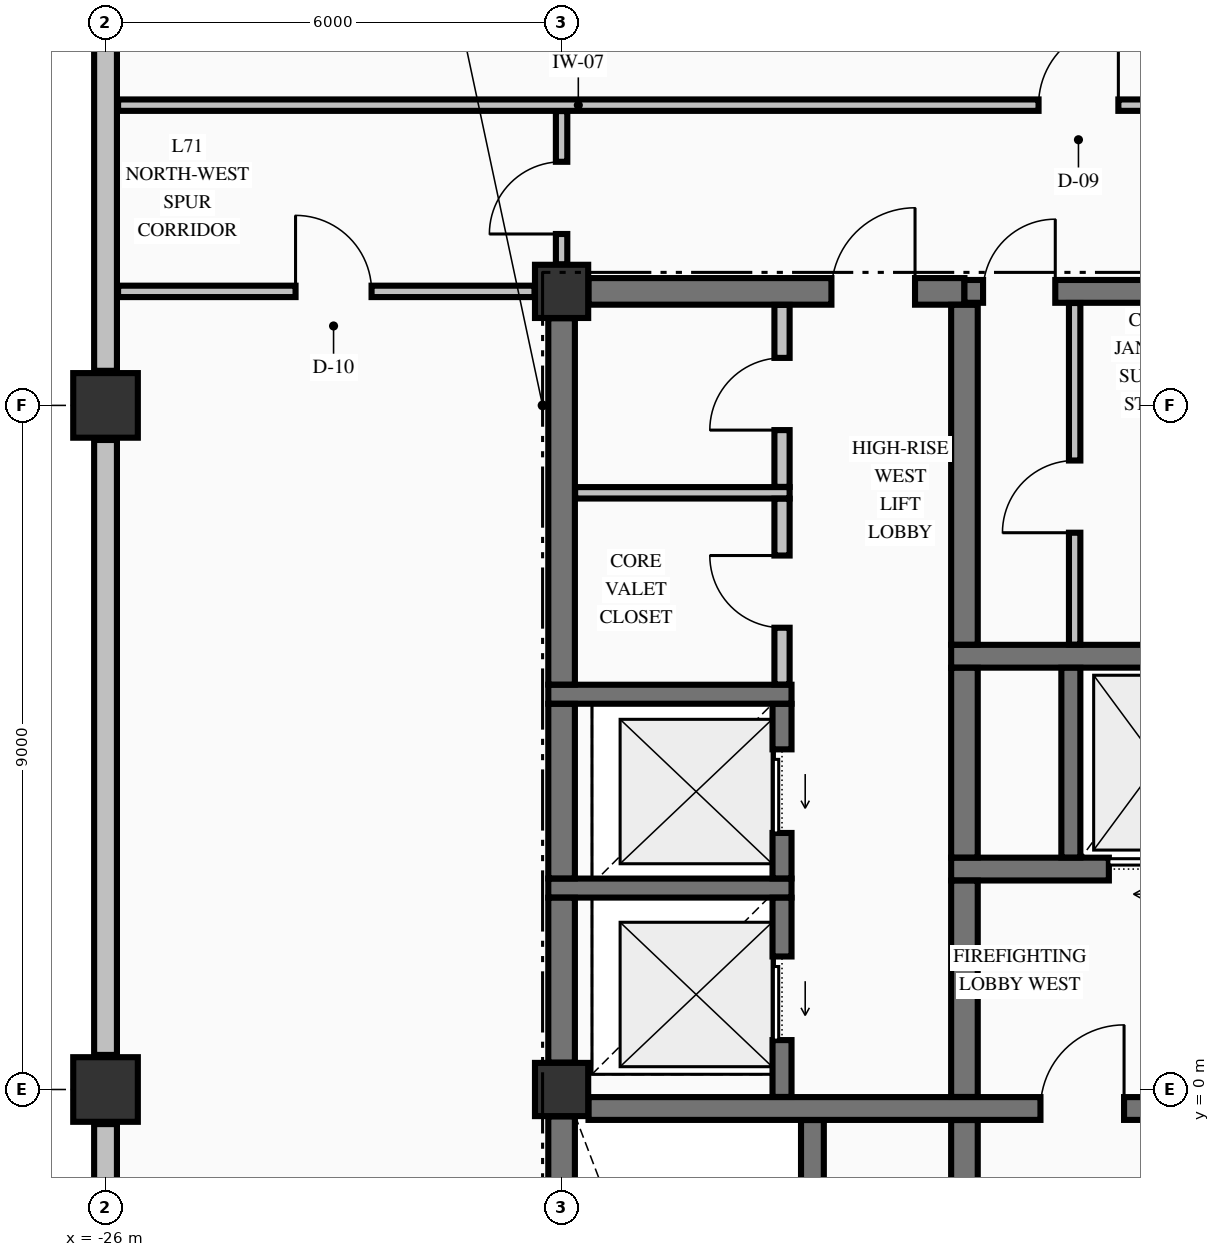
"""IFC4 building model, lengths in metres.
Left out: names, types, materials, properties, quantities, classifications, styles, units other than length and angle.
Written with IfcOpenShell. Run it as: python <this file> out.ifc"""

import sys

from ifc_helpers import new_model, si_unit, direction, frame, frame_2d, origin, origin_2d, place, context, subcontext, project, spatial, rectangle, extrude, element, fill, save


model = new_model("IFC4")
c1 = context("Model", 3, precision=1e-05, world=origin(), true_north=direction((0.0, 1.0)))
c2 = subcontext(c1, "Body", "Model", "MODEL_VIEW")
j1 = project(units=[si_unit("LENGTHUNIT", "METRE"), si_unit("PLANEANGLEUNIT", "RADIAN")], contexts=[c1])
p1 = place(None, origin())
s1 = spatial("IfcSite", under=j1, at=p1, CompositionType="ELEMENT")
p2 = place(p1, origin())
s2 = spatial("IfcBuilding", under=s1, at=p2, CompositionType="ELEMENT")
p3 = place(p2, frame((0.0, 0.0, 267.35)))
s3 = spatial("IfcBuildingStorey", under=s2, at=p3, CompositionType="ELEMENT", Elevation=267.35)
for number, where, z_axis, x_axis in (
    (1, (-26.0, 0.0, -0.25), (0.0, 0.0, 1.0), (1.0, 0.0, 0.0)),
    (2, (-26.0, 9.0, -0.25), (0.0, 0.0, 1.0), (1.0, 0.0, 0.0)),
):
    element("IfcColumn", number, at=place(p3, frame(where, z_axis=z_axis, x_axis=x_axis)), inside=s3, PredefinedType="COLUMN", context=c2, shape_type="SweptSolid", body=[
        extrude(rectangle(XDim=0.85, YDim=0.85, at=origin_2d()), origin(), (0.0, 0.0, 1.0), 3.155),
    ])
for number, where, z_axis, x_axis in (
    (3, (-20.0, 10.5, -0.25), (0.0, 0.0, 1.0), (1.0, 0.0, 0.0)),
    (4, (-20.0, 0.0, -0.25), (0.0, 0.0, 1.0), (1.0, 0.0, 0.0)),
):
    element("IfcColumn", number, at=place(p3, frame(where, z_axis=z_axis, x_axis=x_axis)), inside=s3, PredefinedType="COLUMN", context=c2, shape_type="SweptSolid", body=[
        extrude(rectangle(XDim=0.7, YDim=0.7, at=origin_2d()), origin(), (0.0, 0.0, 1.0), 3.155),
    ])
for number, where, z_axis, x_axis in (
    (5, (-26.0, -0.455, 0.0), (0.0, 0.0, 1.0), (0.0, -1.0, 0.0)),
    (6, (-26.0, 8.545, 0.0), (0.0, 0.0, 1.0), (0.0, -1.0, 0.0)),
    (7, (-26.0, 17.545, 0.0), (0.0, 0.0, 1.0), (0.0, -1.0, 0.0)),
):
    element("IfcWall", number, at=place(p3, frame(where, z_axis=z_axis, x_axis=x_axis)), inside=s3, PredefinedType="STANDARD", context=c2, shape_type="SweptSolid", body=[
        extrude(rectangle(XDim=8.09, YDim=0.3, at=frame_2d((4.045, 0.0))), origin(), (0.0, 0.0, 1.0), 2.297),
    ])
p4 = place(p3, frame((-19.646, -0.25, 0.0), z_axis=(0.0, 0.0, 1.0), x_axis=(1.0, 0.0, 0.0)))
e8 = element("IfcWall", 8, at=p4, inside=s3, PredefinedType="SHEAR", context=c2, shape_type="SweptSolid", body=[
    extrude(rectangle(XDim=8.292, YDim=0.3, at=frame_2d((4.146, 0.0))), origin(), (0.0, 0.0, 1.0), 2.905),
])
p5 = place(p4, frame((5.946, 0.0, 0.0)))
e9 = element("IfcOpeningElement", 9, at=p5, cuts=e8, PredefinedType="OPENING", context=c2, shape_type="SweptSolid", body=[
    extrude(rectangle(XDim=1.1, YDim=2.15, at=frame_2d((0.55, 1.075))), frame((0.0, 0.16, 0.0), z_axis=(0.0, -1.0, 0.0), x_axis=(1.0, 0.0, 0.0)), (0.0, 0.0, 1.0), 0.32),
])
p6 = place(p3, frame((-20.175, 2.65, 0.0), z_axis=(0.0, 0.0, 1.0), x_axis=(1.0, 0.0, 0.0)))
e10 = element("IfcWall", 10, at=p6, inside=s3, PredefinedType="SOLIDWALL", context=c2, shape_type="SweptSolid", body=[
    extrude(rectangle(XDim=3.2, YDim=0.25, at=frame_2d((1.6, 0.0))), origin(), (0.0, 0.0, 1.0), 2.905),
])
p7 = place(p3, frame((-14.875, 2.9, 0.0), z_axis=(0.0, 0.0, 1.0), x_axis=(1.0, 0.0, 0.0)))
e11 = element("IfcWall", 11, at=p7, inside=s3, PredefinedType="SHEAR", context=c2, shape_type="SweptSolid", body=[
    extrude(rectangle(XDim=4.025, YDim=0.3, at=frame_2d((2.012, 0.0))), origin(), (0.0, 0.0, 1.0), 2.905),
])
p8 = place(p7, frame((2.075, 0.0, 0.0)))
e12 = element("IfcOpeningElement", 12, at=p8, cuts=e11, PredefinedType="OPENING", context=c2, shape_type="SweptSolid", body=[
    extrude(rectangle(XDim=1.1, YDim=2.2, at=frame_2d((0.55, 1.1))), frame((0.0, 0.16, 0.0), z_axis=(0.0, -1.0, 0.0), x_axis=(1.0, 0.0, 0.0)), (0.0, 0.0, 1.0), 0.32),
])
p9 = place(p3, frame((-20.175, 5.2, 0.0), z_axis=(0.0, 0.0, 1.0), x_axis=(1.0, 0.0, 0.0)))
e13 = element("IfcWall", 13, at=p9, inside=s3, PredefinedType="SOLIDWALL", context=c2, shape_type="SweptSolid", body=[
    extrude(rectangle(XDim=3.2, YDim=0.25, at=frame_2d((1.6, 0.0))), origin(), (0.0, 0.0, 1.0), 2.905),
])
p10 = place(p3, frame((-14.875, 5.7, 0.0), z_axis=(0.0, 0.0, 1.0), x_axis=(1.0, 0.0, 0.0)))
e14 = element("IfcWall", 14, at=p10, inside=s3, PredefinedType="SHEAR", context=c2, shape_type="SweptSolid", body=[
    extrude(rectangle(XDim=4.025, YDim=0.3, at=frame_2d((2.012, 0.0))), origin(), (0.0, 0.0, 1.0), 2.905),
])
p11 = place(p3, frame((-19.646, 10.5, 0.0), z_axis=(0.0, 0.0, 1.0), x_axis=(1.0, 0.0, 0.0)))
e15 = element("IfcWall", 15, at=p11, inside=s3, PredefinedType="SHEAR", context=c2, shape_type="SweptSolid", body=[
    extrude(rectangle(XDim=4.946, YDim=0.35, at=frame_2d((2.473, 0.0))), origin(), (0.0, 0.0, 1.0), 2.905),
])
p12 = place(p11, frame((3.196, 0.0, 0.0)))
e16 = element("IfcOpeningElement", 16, at=p12, cuts=e15, PredefinedType="OPENING", context=c2, shape_type="SweptSolid", body=[
    extrude(rectangle(XDim=1.1, YDim=2.15, at=frame_2d((0.55, 1.075))), frame((0.0, 0.185, 0.0), z_axis=(0.0, -1.0, 0.0), x_axis=(1.0, 0.0, 0.0)), (0.0, 0.0, 1.0), 0.37),
])
p13 = place(p3, frame((-14.7, 10.5, 0.0), z_axis=(0.0, 0.0, 1.0), x_axis=(1.0, 0.0, 0.0)))
e17 = element("IfcWall", 17, at=p13, inside=s3, PredefinedType="SHEAR", context=c2, shape_type="SweptSolid", body=[
    extrude(rectangle(XDim=3.346, YDim=0.3, at=frame_2d((1.673, 0.0))), origin(), (0.0, 0.0, 1.0), 2.905),
])
p14 = place(p13, frame((0.245, 0.0, 0.0)))
e18 = element("IfcOpeningElement", 18, at=p14, cuts=e17, PredefinedType="OPENING", context=c2, shape_type="SweptSolid", body=[
    extrude(rectangle(XDim=0.95, YDim=2.15, at=frame_2d((0.475, 1.075))), frame((0.0, 0.16, 0.0), z_axis=(0.0, -1.0, 0.0), x_axis=(1.0, 0.0, 0.0)), (0.0, 0.0, 1.0), 0.32),
])
p15 = place(p3, frame((-19.822, 7.85, 0.0), z_axis=(0.0, 0.0, 1.0), x_axis=(1.0, 0.0, 0.0)))
e19 = element("IfcWall", 19, at=p15, inside=s3, PredefinedType="PARTITIONING", context=c2, shape_type="SweptSolid", body=[
    extrude(rectangle(XDim=2.822, YDim=0.15, at=frame_2d((1.411, 0.0))), origin(), (0.0, 0.0, 1.0), 2.905),
])
p16 = place(p3, frame((-25.835, 10.5, 0.0), z_axis=(0.0, 0.0, 1.0), x_axis=(1.0, 0.0, 0.0)))
e20 = element("IfcWall", 20, at=p16, inside=s3, PredefinedType="PARTITIONING", context=c2, shape_type="SweptSolid", body=[
    extrude(rectangle(XDim=5.479, YDim=0.15, at=frame_2d((2.74, 0.0))), origin(), (0.0, 0.0, 1.0), 2.905),
])
p17 = place(p16, frame((2.335, 0.0, 0.0)))
e21 = element("IfcOpeningElement", 21, at=p17, cuts=e20, PredefinedType="OPENING", context=c2, shape_type="SweptSolid", body=[
    extrude(rectangle(XDim=1.0, YDim=2.15, at=frame_2d((0.5, 1.075))), frame((0.0, 0.085, 0.0), z_axis=(0.0, -1.0, 0.0), x_axis=(1.0, 0.0, 0.0)), (0.0, 0.0, 1.0), 0.17),
])
p18 = place(p3, frame((-25.835, 12.95, 0.0), z_axis=(0.0, 0.0, 1.0), x_axis=(1.0, 0.0, 0.0)))
e22 = element("IfcWall", 22, at=p18, inside=s3, PredefinedType="PARTITIONING", context=c2, shape_type="SweptSolid", body=[
    extrude(rectangle(XDim=45.91, YDim=0.15, at=frame_2d((22.955, 0.0))), origin(), (0.0, 0.0, 1.0), 2.905),
])
p19 = place(p18, frame((12.11, 0.0, 0.0)))
e23 = element("IfcOpeningElement", 23, at=p19, cuts=e22, PredefinedType="OPENING", context=c2, shape_type="SweptSolid", body=[
    extrude(rectangle(XDim=1.05, YDim=2.15, at=frame_2d((0.525, 1.075))), frame((0.0, 0.085, 0.0), z_axis=(0.0, -1.0, 0.0), x_axis=(1.0, 0.0, 0.0)), (0.0, 0.0, 1.0), 0.17),
])
p20 = place(p18, frame((23.71, 0.0, 0.0)))
e24 = element("IfcOpeningElement", 24, at=p20, cuts=e22, PredefinedType="OPENING", context=c2, shape_type="SweptSolid", body=[
    extrude(rectangle(XDim=1.05, YDim=2.15, at=frame_2d((0.525, 1.075))), frame((0.0, 0.085, 0.0), z_axis=(0.0, -1.0, 0.0), x_axis=(1.0, 0.0, 0.0)), (0.0, 0.0, 1.0), 0.17),
])
p21 = place(p18, frame((34.76, 0.0, 0.0)))
e25 = element("IfcOpeningElement", 25, at=p21, cuts=e22, PredefinedType="OPENING", context=c2, shape_type="SweptSolid", body=[
    extrude(rectangle(XDim=1.05, YDim=2.15, at=frame_2d((0.525, 1.075))), frame((0.0, 0.085, 0.0), z_axis=(0.0, -1.0, 0.0), x_axis=(1.0, 0.0, 0.0)), (0.0, 0.0, 1.0), 0.17),
])
p22 = place(p3, frame((-20.0, -9.596, 0.0), z_axis=(0.0, 0.0, 1.0), x_axis=(0.0, 1.0, 0.0)))
e26 = element("IfcWall", 26, at=p22, inside=s3, PredefinedType="SHEAR", context=c2, shape_type="SweptSolid", body=[
    extrude(rectangle(XDim=9.242, YDim=0.35, at=frame_2d((4.621, 0.0))), origin(), (0.0, 0.0, 1.0), 2.905),
])
p23 = place(p3, frame((-20.0, 0.354, 0.0), z_axis=(0.0, 0.0, 1.0), x_axis=(0.0, 1.0, 0.0)))
e27 = element("IfcWall", 27, at=p23, inside=s3, PredefinedType="SHEAR", context=c2, shape_type="SweptSolid", body=[
    extrude(rectangle(XDim=2.169, YDim=0.35, at=frame_2d((1.084, 0.0))), origin(), (0.0, 0.0, 1.0), 2.905),
])
p24 = place(p3, frame((-20.0, 2.777, 0.0), z_axis=(0.0, 0.0, 1.0), x_axis=(0.0, 1.0, 0.0)))
e28 = element("IfcWall", 28, at=p24, inside=s3, PredefinedType="SHEAR", context=c2, shape_type="SweptSolid", body=[
    extrude(rectangle(XDim=2.296, YDim=0.35, at=frame_2d((1.148, 0.0))), origin(), (0.0, 0.0, 1.0), 2.905),
])
p25 = place(p3, frame((-20.0, 5.327, 0.0), z_axis=(0.0, 0.0, 1.0), x_axis=(0.0, 1.0, 0.0)))
e29 = element("IfcWall", 29, at=p25, inside=s3, PredefinedType="SHEAR", context=c2, shape_type="SweptSolid", body=[
    extrude(rectangle(XDim=4.819, YDim=0.35, at=frame_2d((2.41, 0.0))), origin(), (0.0, 0.0, 1.0), 2.905),
])
p26 = place(p3, frame((-17.1, -0.098, 0.0), z_axis=(0.0, 0.0, 1.0), x_axis=(0.0, 1.0, 0.0)))
e30 = element("IfcWall", 30, at=p26, inside=s3, PredefinedType="SOLIDWALL", context=c2, shape_type="SweptSolid", body=[
    extrude(rectangle(XDim=2.621, YDim=0.25, at=frame_2d((1.311, 0.0))), origin(), (0.0, 0.0, 1.0), 2.905),
])
p27 = place(p26, frame((0.748, 0.0, 0.0)))
e31 = element("IfcOpeningElement", 31, at=p27, cuts=e30, PredefinedType="OPENING", context=c2, shape_type="SweptSolid", body=[
    extrude(rectangle(XDim=1.1, YDim=2.2, at=frame_2d((0.55, 1.1))), frame((0.0, 0.135, 0.0), z_axis=(0.0, -1.0, 0.0), x_axis=(1.0, 0.0, 0.0)), (0.0, 0.0, 1.0), 0.27),
])
p28 = place(p3, frame((-17.1, 2.777, 0.0), z_axis=(0.0, 0.0, 1.0), x_axis=(0.0, 1.0, 0.0)))
e32 = element("IfcWall", 32, at=p28, inside=s3, PredefinedType="SOLIDWALL", context=c2, shape_type="SweptSolid", body=[
    extrude(rectangle(XDim=2.296, YDim=0.25, at=frame_2d((1.148, 0.0))), origin(), (0.0, 0.0, 1.0), 2.905),
])
p29 = place(p28, frame((0.598, 0.0, 0.0)))
e33 = element("IfcOpeningElement", 33, at=p29, cuts=e32, PredefinedType="OPENING", context=c2, shape_type="SweptSolid", body=[
    extrude(rectangle(XDim=1.1, YDim=2.2, at=frame_2d((0.55, 1.1))), frame((0.0, 0.135, 0.0), z_axis=(0.0, -1.0, 0.0), x_axis=(1.0, 0.0, 0.0)), (0.0, 0.0, 1.0), 0.27),
])
p30 = place(p3, frame((-16.7, -9.773, 0.0), z_axis=(0.0, 0.0, 1.0), x_axis=(0.0, 1.0, 0.0)))
e34 = element("IfcWall", 34, at=p30, inside=s3, PredefinedType="SHEAR", context=c2, shape_type="SweptSolid", body=[
    extrude(rectangle(XDim=9.371, YDim=0.3, at=frame_2d((4.686, 0.0))), origin(), (0.0, 0.0, 1.0), 2.905),
])
p31 = place(p3, frame((-14.7, -9.773, 0.0), z_axis=(0.0, 0.0, 1.0), x_axis=(0.0, 1.0, 0.0)))
e35 = element("IfcWall", 35, at=p31, inside=s3, PredefinedType="SHEAR", context=c2, shape_type="SweptSolid", body=[
    extrude(rectangle(XDim=9.371, YDim=0.35, at=frame_2d((4.686, 0.0))), origin(), (0.0, 0.0, 1.0), 2.905),
])
p32 = place(p3, frame((-14.7, -0.098, 0.0), z_axis=(0.0, 0.0, 1.0), x_axis=(0.0, 1.0, 0.0)))
e36 = element("IfcWall", 36, at=p32, inside=s3, PredefinedType="SHEAR", context=c2, shape_type="SweptSolid", body=[
    extrude(rectangle(XDim=2.846, YDim=0.35, at=frame_2d((1.423, 0.0))), origin(), (0.0, 0.0, 1.0), 2.905),
])
p33 = place(p3, frame((-14.7, 3.052, 0.0), z_axis=(0.0, 0.0, 1.0), x_axis=(0.0, 1.0, 0.0)))
e37 = element("IfcWall", 37, at=p33, inside=s3, PredefinedType="SHEAR", context=c2, shape_type="SweptSolid", body=[
    extrude(rectangle(XDim=2.496, YDim=0.35, at=frame_2d((1.248, 0.0))), origin(), (0.0, 0.0, 1.0), 2.905),
])
p34 = place(p3, frame((-14.7, 5.852, 0.0), z_axis=(0.0, 0.0, 1.0), x_axis=(0.0, 1.0, 0.0)))
e38 = element("IfcWall", 38, at=p34, inside=s3, PredefinedType="SHEAR", context=c2, shape_type="SweptSolid", body=[
    extrude(rectangle(XDim=4.471, YDim=0.35, at=frame_2d((2.235, 0.0))), origin(), (0.0, 0.0, 1.0), 2.905),
])
p35 = place(p3, frame((-13.3, 3.052, 0.0), z_axis=(0.0, 0.0, 1.0), x_axis=(0.0, 1.0, 0.0)))
e39 = element("IfcWall", 39, at=p35, inside=s3, PredefinedType="SOLIDWALL", context=c2, shape_type="SweptSolid", body=[
    extrude(rectangle(XDim=2.496, YDim=0.25, at=frame_2d((1.248, 0.0))), origin(), (0.0, 0.0, 1.0), 2.905),
])
p36 = place(p3, frame((-20.0, 10.856, 0.0), z_axis=(0.0, 0.0, 1.0), x_axis=(0.0, 1.0, 0.0)))
e40 = element("IfcWall", 40, at=p36, inside=s3, PredefinedType="PARTITIONING", context=c2, shape_type="SweptSolid", body=[
    extrude(rectangle(XDim=2.016, YDim=0.15, at=frame_2d((1.008, 0.0))), origin(), (0.0, 0.0, 1.0), 2.905),
])
p37 = place(p36, frame((0.399, 0.0, 0.0)))
e41 = element("IfcOpeningElement", 41, at=p37, cuts=e40, PredefinedType="OPENING", context=c2, shape_type="SweptSolid", body=[
    extrude(rectangle(XDim=0.95, YDim=2.15, at=frame_2d((0.475, 1.075))), frame((0.0, 0.085, 0.0), z_axis=(0.0, -1.0, 0.0), x_axis=(1.0, 0.0, 0.0)), (0.0, 0.0, 1.0), 0.17),
])
p38 = place(p3, frame((-17.1, 5.328, 0.0), z_axis=(0.0, 0.0, 1.0), x_axis=(0.0, 1.0, 0.0)))
e42 = element("IfcWall", 42, at=p38, inside=s3, PredefinedType="PARTITIONING", context=c2, shape_type="SweptSolid", body=[
    extrude(rectangle(XDim=2.444, YDim=0.2, at=frame_2d((1.222, 0.0))), origin(), (0.0, 0.0, 1.0), 2.905),
])
p39 = place(p38, frame((0.747, 0.0, 0.0)))
e43 = element("IfcOpeningElement", 43, at=p39, cuts=e42, PredefinedType="OPENING", context=c2, shape_type="SweptSolid", body=[
    extrude(rectangle(XDim=0.95, YDim=2.15, at=frame_2d((0.475, 1.075))), frame((0.0, 0.11, 0.0), z_axis=(0.0, -1.0, 0.0), x_axis=(1.0, 0.0, 0.0)), (0.0, 0.0, 1.0), 0.22),
])
p40 = place(p3, frame((-17.1, 7.928, 0.0), z_axis=(0.0, 0.0, 1.0), x_axis=(0.0, 1.0, 0.0)))
e44 = element("IfcWall", 44, at=p40, inside=s3, PredefinedType="PARTITIONING", context=c2, shape_type="SweptSolid", body=[
    extrude(rectangle(XDim=2.394, YDim=0.2, at=frame_2d((1.197, 0.0))), origin(), (0.0, 0.0, 1.0), 2.905),
])
p41 = place(p40, frame((0.747, 0.0, 0.0)))
e45 = element("IfcOpeningElement", 45, at=p41, cuts=e44, PredefinedType="OPENING", context=c2, shape_type="SweptSolid", body=[
    extrude(rectangle(XDim=0.95, YDim=2.15, at=frame_2d((0.475, 1.075))), frame((0.0, 0.11, 0.0), z_axis=(0.0, -1.0, 0.0), x_axis=(1.0, 0.0, 0.0)), (0.0, 0.0, 1.0), 0.22),
])
p42 = place(p3, frame((-13.25, 5.853, 0.0), z_axis=(0.0, 0.0, 1.0), x_axis=(0.0, 1.0, 0.0)))
e46 = element("IfcWall", 46, at=p42, inside=s3, PredefinedType="PARTITIONING", context=c2, shape_type="SweptSolid", body=[
    extrude(rectangle(XDim=4.494, YDim=0.15, at=frame_2d((2.247, 0.0))), origin(), (0.0, 0.0, 1.0), 2.905),
])
p43 = place(p42, frame((1.472, 0.0, 0.0)))
e47 = element("IfcOpeningElement", 47, at=p43, cuts=e46, PredefinedType="OPENING", context=c2, shape_type="SweptSolid", body=[
    extrude(rectangle(XDim=0.95, YDim=2.15, at=frame_2d((0.475, 1.075))), frame((0.0, 0.085, 0.0), z_axis=(0.0, -1.0, 0.0), x_axis=(1.0, 0.0, 0.0)), (0.0, 0.0, 1.0), 0.17),
])
p44 = place(p5, origin())
e48 = element("IfcDoor", 48, at=p44, inside=s3, OperationType="SINGLE_SWING_RIGHT", PredefinedType="DOOR", context=c2, shape_type="SweptSolid", body=[
    extrude(rectangle(XDim=1.1, YDim=2.15, at=frame_2d((0.55, 1.075))), frame((0.0, 0.025, 0.0), z_axis=(0.0, -1.0, 0.0), x_axis=(1.0, 0.0, 0.0)), (0.0, 0.0, 1.0), 0.05),
])
fill(e9, e48)
p45 = place(p8, origin())
e49 = element("IfcDoor", 49, at=p45, inside=s3, OperationType="SLIDING_TO_LEFT", PredefinedType="DOOR", context=c2, shape_type="SweptSolid", body=[
    extrude(rectangle(XDim=1.1, YDim=2.2, at=frame_2d((0.55, 1.1))), frame((0.0, 0.025, 0.0), z_axis=(0.0, -1.0, 0.0), x_axis=(1.0, 0.0, 0.0)), (0.0, 0.0, 1.0), 0.05),
])
fill(e12, e49)
p46 = place(p14, origin())
e50 = element("IfcDoor", 50, at=p46, inside=s3, OperationType="SINGLE_SWING_RIGHT", PredefinedType="DOOR", context=c2, shape_type="SweptSolid", body=[
    extrude(rectangle(XDim=0.95, YDim=2.15, at=frame_2d((0.475, 1.075))), frame((0.0, 0.025, 0.0), z_axis=(0.0, -1.0, 0.0), x_axis=(1.0, 0.0, 0.0)), (0.0, 0.0, 1.0), 0.05),
])
fill(e18, e50)
p47 = place(p43, origin())
e51 = element("IfcDoor", 51, at=p47, inside=s3, OperationType="SINGLE_SWING_LEFT", PredefinedType="DOOR", context=c2, shape_type="SweptSolid", body=[
    extrude(rectangle(XDim=0.95, YDim=2.15, at=frame_2d((0.475, 1.075))), frame((0.0, 0.025, 0.0), z_axis=(0.0, -1.0, 0.0), x_axis=(1.0, 0.0, 0.0)), (0.0, 0.0, 1.0), 0.05),
])
fill(e47, e51)
p48 = place(p27, origin())
e52 = element("IfcDoor", 52, at=p48, inside=s3, OperationType="SLIDING_TO_LEFT", PredefinedType="DOOR", context=c2, shape_type="SweptSolid", body=[
    extrude(rectangle(XDim=1.1, YDim=2.2, at=frame_2d((0.55, 1.1))), frame((0.0, 0.025, 0.0), z_axis=(0.0, -1.0, 0.0), x_axis=(1.0, 0.0, 0.0)), (0.0, 0.0, 1.0), 0.05),
])
fill(e31, e52)
p49 = place(p29, origin())
e53 = element("IfcDoor", 53, at=p49, inside=s3, OperationType="SLIDING_TO_LEFT", PredefinedType="DOOR", context=c2, shape_type="SweptSolid", body=[
    extrude(rectangle(XDim=1.1, YDim=2.2, at=frame_2d((0.55, 1.1))), frame((0.0, 0.025, 0.0), z_axis=(0.0, -1.0, 0.0), x_axis=(1.0, 0.0, 0.0)), (0.0, 0.0, 1.0), 0.05),
])
fill(e33, e53)
p50 = place(p12, origin())
e54 = element("IfcDoor", 54, at=p50, inside=s3, OperationType="SINGLE_SWING_RIGHT", PredefinedType="DOOR", context=c2, shape_type="SweptSolid", body=[
    extrude(rectangle(XDim=1.1, YDim=2.15, at=frame_2d((0.55, 1.075))), frame((0.0, 0.025, 0.0), z_axis=(0.0, -1.0, 0.0), x_axis=(1.0, 0.0, 0.0)), (0.0, 0.0, 1.0), 0.05),
])
fill(e16, e54)
p51 = place(p41, origin())
e55 = element("IfcDoor", 55, at=p51, inside=s3, OperationType="SINGLE_SWING_LEFT", PredefinedType="DOOR", context=c2, shape_type="SweptSolid", body=[
    extrude(rectangle(XDim=0.95, YDim=2.15, at=frame_2d((0.475, 1.075))), frame((0.0, 0.025, 0.0), z_axis=(0.0, -1.0, 0.0), x_axis=(1.0, 0.0, 0.0)), (0.0, 0.0, 1.0), 0.05),
])
fill(e45, e55)
p52 = place(p39, origin())
e56 = element("IfcDoor", 56, at=p52, inside=s3, OperationType="SINGLE_SWING_RIGHT", PredefinedType="DOOR", context=c2, shape_type="SweptSolid", body=[
    extrude(rectangle(XDim=0.95, YDim=2.15, at=frame_2d((0.475, 1.075))), frame((0.0, 0.025, 0.0), z_axis=(0.0, -1.0, 0.0), x_axis=(1.0, 0.0, 0.0)), (0.0, 0.0, 1.0), 0.05),
])
fill(e43, e56)
p53 = place(p19, origin())
e57 = element("IfcDoor", 57, at=p53, inside=s3, OperationType="SINGLE_SWING_RIGHT", PredefinedType="DOOR", context=c2, shape_type="SweptSolid", body=[
    extrude(rectangle(XDim=1.05, YDim=2.15, at=frame_2d((0.525, 1.075))), frame((0.0, 0.025, 0.0), z_axis=(0.0, -1.0, 0.0), x_axis=(1.0, 0.0, 0.0)), (0.0, 0.0, 1.0), 0.05),
])
fill(e23, e57)
p54 = place(p37, origin())
e58 = element("IfcDoor", 58, at=p54, inside=s3, OperationType="SINGLE_SWING_LEFT", PredefinedType="DOOR", context=c2, shape_type="SweptSolid", body=[
    extrude(rectangle(XDim=0.95, YDim=2.15, at=frame_2d((0.475, 1.075))), frame((0.0, 0.025, 0.0), z_axis=(0.0, -1.0, 0.0), x_axis=(1.0, 0.0, 0.0)), (0.0, 0.0, 1.0), 0.05),
])
fill(e41, e58)
p55 = place(p17, origin())
e59 = element("IfcDoor", 59, at=p55, inside=s3, OperationType="SINGLE_SWING_LEFT", PredefinedType="DOOR", context=c2, shape_type="SweptSolid", body=[
    extrude(rectangle(XDim=1.0, YDim=2.15, at=frame_2d((0.5, 1.075))), frame((0.0, 0.025, 0.0), z_axis=(0.0, -1.0, 0.0), x_axis=(1.0, 0.0, 0.0)), (0.0, 0.0, 1.0), 0.05),
])
fill(e21, e59)
save(model, sys.argv[1])
